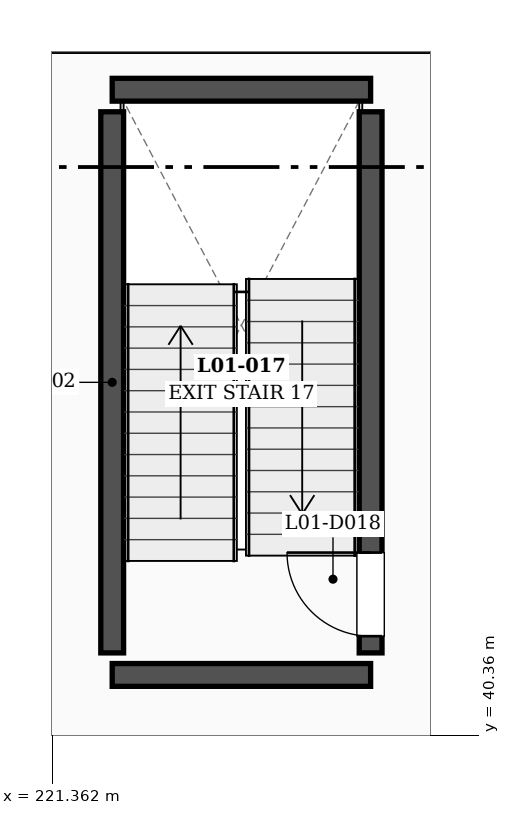
"""IFC4 building model, lengths in metres.
Left out: names, types, materials, properties, quantities, classifications, styles, units other than length and angle.
Written with IfcOpenShell. Run it as: python <this file> out.ifc"""

import sys

from ifc_helpers import new_model, si_unit, direction, frame, frame_2d, origin, place, context, subcontext, project, spatial, rectangle, extrude, element, fill, save


model = new_model("IFC4")
c1 = context("Model", 3, precision=1e-05, world=origin(), true_north=direction((0.0, 1.0)))
c2 = subcontext(c1, "Body", "Model", "MODEL_VIEW")
j1 = project(units=[si_unit("LENGTHUNIT", "METRE"), si_unit("PLANEANGLEUNIT", "RADIAN")], contexts=[c1])
p1 = place(None, origin())
s1 = spatial("IfcSite", under=j1, at=p1, CompositionType="ELEMENT")
p2 = place(p1, origin())
s2 = spatial("IfcBuilding", under=s1, at=p2, CompositionType="ELEMENT")
p3 = place(p2, frame((0.0, 0.0, 6.0)))
s3 = spatial("IfcBuildingStorey", under=s2, at=p3, CompositionType="ELEMENT", Elevation=6.0)
for number, where, z_axis, x_axis in (
    (1, (222.15, 41.15, 0.0), (0.0, 0.0, 1.0), (1.0, 0.0, 0.0)),
    (2, (222.15, 48.85, 0.0), (0.0, 0.0, 1.0), (1.0, 0.0, 0.0)),
):
    element("IfcWall", number, at=place(p3, frame(where, z_axis=z_axis, x_axis=x_axis)), inside=s3, PredefinedType="SHEAR", context=c2, shape_type="SweptSolid", body=[
        extrude(rectangle(XDim=3.4, YDim=0.3, at=frame_2d((1.7, 0.0))), origin(), (0.0, 0.0, 1.0), 4.8),
    ])
p4 = place(p3, frame((222.15, 41.44, 0.0), z_axis=(0.0, 0.0, 1.0), x_axis=(0.0, 1.0, 0.0)))
e3 = element("IfcWall", 3, at=p4, inside=s3, PredefinedType="SHEAR", context=c2, shape_type="SweptSolid", body=[
    extrude(rectangle(XDim=7.12, YDim=0.3, at=frame_2d((3.56, 0.0))), origin(), (0.0, 0.0, 1.0), 4.8),
])
p5 = place(p3, frame((225.55, 41.44, 0.0), z_axis=(0.0, 0.0, 1.0), x_axis=(0.0, 1.0, 0.0)))
e4 = element("IfcWall", 4, at=p5, inside=s3, PredefinedType="SHEAR", context=c2, shape_type="SweptSolid", body=[
    extrude(rectangle(XDim=7.12, YDim=0.3, at=frame_2d((3.56, 0.0))), origin(), (0.0, 0.0, 1.0), 4.8),
])
p6 = place(p5, frame((0.22, 0.0, 0.0)))
e5 = element("IfcOpeningElement", 5, at=p6, cuts=e4, PredefinedType="OPENING", context=c2, shape_type="SweptSolid", body=[
    extrude(rectangle(XDim=1.1, YDim=2.2, at=frame_2d((0.55, 1.1))), frame((0.0, 0.16, 0.0), z_axis=(0.0, -1.0, 0.0), x_axis=(1.0, 0.0, 0.0)), (0.0, 0.0, 1.0), 0.32),
])
p7 = place(p6, origin())
e6 = element("IfcDoor", 6, at=p7, inside=s3, OperationType="SINGLE_SWING_RIGHT", PredefinedType="DOOR", context=c2, shape_type="SweptSolid", body=[
    extrude(rectangle(XDim=1.1, YDim=2.2, at=frame_2d((0.55, 1.1))), frame((0.0, 0.025, 0.0), z_axis=(0.0, -1.0, 0.0), x_axis=(1.0, 0.0, 0.0)), (0.0, 0.0, 1.0), 0.05),
])
fill(e5, e6)
save(model, sys.argv[1])
